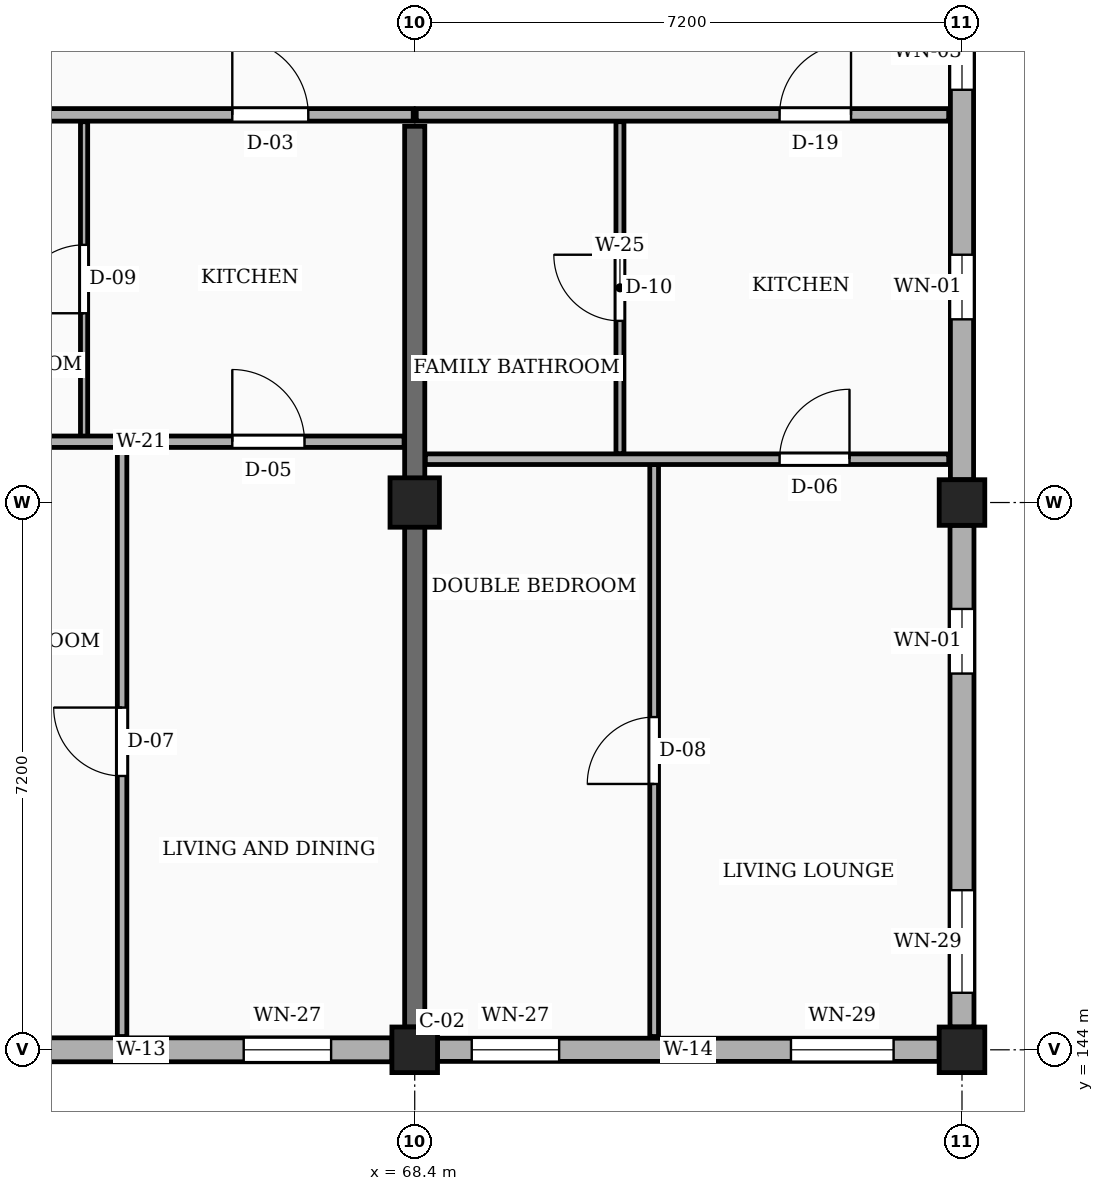
"""IFC4 building model, lengths in metres.
Left out: names, types, materials, properties, quantities, classifications, styles, units other than length and angle.
Written with IfcOpenShell. Run it as: python <this file> out.ifc"""

import sys

from ifc_helpers import new_model, si_unit, direction, frame, frame_2d, origin, origin_2d, place, context, subcontext, project, spatial, rectangle, extrude, element, fill, save


model = new_model("IFC4")
c1 = context("Model", 3, precision=1e-05, world=origin(), true_north=direction((0.0, 1.0)))
c2 = subcontext(c1, "Body", "Model", "MODEL_VIEW")
j1 = project(units=[si_unit("LENGTHUNIT", "METRE"), si_unit("PLANEANGLEUNIT", "RADIAN")], contexts=[c1])
p1 = place(None, origin())
s1 = spatial("IfcSite", under=j1, at=p1, CompositionType="ELEMENT")
p2 = place(p1, origin())
s2 = spatial("IfcBuilding", under=s1, at=p2, CompositionType="ELEMENT")
p3 = place(p2, frame((0.0, 0.0, 4.5)))
s3 = spatial("IfcBuildingStorey", under=s2, at=p3, CompositionType="ELEMENT", Elevation=4.5)
p4 = place(p3, frame((68.4, 144.0, 0.0), z_axis=(0.0, 0.0, 1.0), x_axis=(1.0, 0.0, 0.0)))
e1 = element("IfcColumn", 1, at=p4, inside=s3, PredefinedType="COLUMN", context=c2, shape_type="SweptSolid", body=[
    extrude(rectangle(XDim=0.6, YDim=0.6, at=origin_2d()), origin(), (0.0, 0.0, 1.0), 3.15),
])
p5 = place(p3, frame((68.4, 151.2, 0.0), z_axis=(0.0, 0.0, 1.0), x_axis=(1.0, 0.0, 0.0)))
e2 = element("IfcColumn", 2, at=p5, inside=s3, PredefinedType="COLUMN", context=c2, shape_type="SweptSolid", body=[
    extrude(rectangle(XDim=0.65, YDim=0.65, at=origin_2d()), origin(), (0.0, 0.0, 1.0), 3.15),
])
for number, where, z_axis, x_axis in (
    (3, (75.6, 144.0, 0.0), (0.0, 0.0, 1.0), (1.0, 0.0, 0.0)),
    (4, (75.6, 151.2, 0.0), (0.0, 0.0, 1.0), (1.0, 0.0, 0.0)),
):
    element("IfcColumn", number, at=place(p3, frame(where, z_axis=z_axis, x_axis=x_axis)), inside=s3, PredefinedType="COLUMN", context=c2, shape_type="SweptSolid", body=[
        extrude(rectangle(XDim=0.6, YDim=0.6, at=origin_2d()), origin(), (0.0, 0.0, 1.0), 3.15),
    ])
p6 = place(p3, frame((68.4, 144.3, 0.0), z_axis=(0.0, 0.0, 1.0), x_axis=(0.0, 1.0, 0.0)))
e5 = element("IfcWall", 5, at=p6, inside=s3, PredefinedType="SOLIDWALL", context=c2, shape_type="SweptSolid", body=[
    extrude(rectangle(XDim=11.85, YDim=0.265, at=frame_2d((5.925, 0.0))), origin(), (0.0, 0.0, 1.0), 2.185),
])
p7 = place(p3, frame((61.5, 144.0, 0.0), z_axis=(0.0, 0.0, 1.0), x_axis=(1.0, 0.0, 0.0)))
e6 = element("IfcWall", 6, at=p7, inside=s3, PredefinedType="SOLIDWALL", context=c2, shape_type="SweptSolid", body=[
    extrude(rectangle(XDim=6.6, YDim=0.315, at=frame_2d((3.3, 0.0))), origin(), (0.0, 0.0, 1.0), 2.455),
])
p8 = place(p7, frame((0.45, 0.0, 0.78)))
e7 = element("IfcOpeningElement", 7, at=p8, cuts=e6, PredefinedType="OPENING", context=c2, shape_type="SweptSolid", body=[
    extrude(rectangle(XDim=0.94, YDim=1.44, at=frame_2d((0.47, 0.72))), frame((0.0, 0.167, 0.0), z_axis=(0.0, -1.0, 0.0), x_axis=(1.0, 0.0, 0.0)), (0.0, 0.0, 1.0), 0.335),
])
p9 = place(p7, frame((4.65, 0.0, 0.78)))
e8 = element("IfcOpeningElement", 8, at=p9, cuts=e6, PredefinedType="OPENING", context=c2, shape_type="SweptSolid", body=[
    extrude(rectangle(XDim=1.15, YDim=1.44, at=frame_2d((0.575, 0.72))), frame((0.0, 0.167, 0.0), z_axis=(0.0, -1.0, 0.0), x_axis=(1.0, 0.0, 0.0)), (0.0, 0.0, 1.0), 0.335),
])
p10 = place(p3, frame((68.7, 144.0, 0.0), z_axis=(0.0, 0.0, 1.0), x_axis=(1.0, 0.0, 0.0)))
e9 = element("IfcWall", 9, at=p10, inside=s3, PredefinedType="SOLIDWALL", context=c2, shape_type="SweptSolid", body=[
    extrude(rectangle(XDim=6.6, YDim=0.305, at=frame_2d((3.3, 0.0))), origin(), (0.0, 0.0, 1.0), 2.455),
])
p11 = place(p10, frame((0.45, 0.0, 0.78)))
e10 = element("IfcOpeningElement", 10, at=p11, cuts=e9, PredefinedType="OPENING", context=c2, shape_type="SweptSolid", body=[
    extrude(rectangle(XDim=1.15, YDim=1.44, at=frame_2d((0.575, 0.72))), frame((0.0, 0.163, 0.0), z_axis=(0.0, -1.0, 0.0), x_axis=(1.0, 0.0, 0.0)), (0.0, 0.0, 1.0), 0.325),
])
p12 = place(p10, frame((4.65, 0.0, 0.78)))
e11 = element("IfcOpeningElement", 11, at=p12, cuts=e9, PredefinedType="OPENING", context=c2, shape_type="SweptSolid", body=[
    extrude(rectangle(XDim=1.35, YDim=1.44, at=frame_2d((0.675, 0.72))), frame((0.0, 0.163, 0.0), z_axis=(0.0, -1.0, 0.0), x_axis=(1.0, 0.0, 0.0)), (0.0, 0.0, 1.0), 0.325),
])
p13 = place(p3, frame((75.6, 144.3, 0.0), z_axis=(0.0, 0.0, 1.0), x_axis=(0.0, 1.0, 0.0)))
e12 = element("IfcWall", 12, at=p13, inside=s3, PredefinedType="SOLIDWALL", context=c2, shape_type="SweptSolid", body=[
    extrude(rectangle(XDim=6.6, YDim=0.315, at=frame_2d((3.3, 0.0))), origin(), (0.0, 0.0, 1.0), 2.455),
])
p14 = place(p13, frame((0.45, 0.0, 0.78)))
e13 = element("IfcOpeningElement", 13, at=p14, cuts=e12, PredefinedType="OPENING", context=c2, shape_type="SweptSolid", body=[
    extrude(rectangle(XDim=1.35, YDim=1.44, at=frame_2d((0.675, 0.72))), frame((0.0, 0.167, 0.0), z_axis=(0.0, -1.0, 0.0), x_axis=(1.0, 0.0, 0.0)), (0.0, 0.0, 1.0), 0.335),
])
p15 = place(p13, frame((4.65, 0.0, 0.78)))
e14 = element("IfcOpeningElement", 14, at=p15, cuts=e12, PredefinedType="OPENING", context=c2, shape_type="SweptSolid", body=[
    extrude(rectangle(XDim=0.85, YDim=1.15, at=frame_2d((0.425, 0.575))), frame((0.0, 0.167, 0.0), z_axis=(0.0, -1.0, 0.0), x_axis=(1.0, 0.0, 0.0)), (0.0, 0.0, 1.0), 0.335),
])
p16 = place(p3, frame((75.6, 151.5, 0.0), z_axis=(0.0, 0.0, 1.0), x_axis=(0.0, 1.0, 0.0)))
e15 = element("IfcWall", 15, at=p16, inside=s3, PredefinedType="SOLIDWALL", context=c2, shape_type="SweptSolid", body=[
    extrude(rectangle(XDim=6.6, YDim=0.305, at=frame_2d((3.3, 0.0))), origin(), (0.0, 0.0, 1.0), 2.455),
])
p17 = place(p16, frame((2.11, 0.0, 0.78)))
e16 = element("IfcOpeningElement", 16, at=p17, cuts=e15, PredefinedType="OPENING", context=c2, shape_type="SweptSolid", body=[
    extrude(rectangle(XDim=0.85, YDim=1.15, at=frame_2d((0.425, 0.575))), frame((0.0, 0.163, 0.0), z_axis=(0.0, -1.0, 0.0), x_axis=(1.0, 0.0, 0.0)), (0.0, 0.0, 1.0), 0.325),
])
p18 = place(p16, frame((5.13, 0.0, 0.78)))
e17 = element("IfcOpeningElement", 17, at=p18, cuts=e15, PredefinedType="OPENING", context=c2, shape_type="SweptSolid", body=[
    extrude(rectangle(XDim=1.0, YDim=1.15, at=frame_2d((0.5, 0.575))), frame((0.0, 0.163, 0.0), z_axis=(0.0, -1.0, 0.0), x_axis=(1.0, 0.0, 0.0)), (0.0, 0.0, 1.0), 0.325),
])
p19 = place(p3, frame((61.22, 156.3, 0.0), z_axis=(0.0, 0.0, 1.0), x_axis=(1.0, 0.0, 0.0)))
e18 = element("IfcWall", 18, at=p19, inside=s3, PredefinedType="PARTITIONING", context=c2, shape_type="SweptSolid", body=[
    extrude(rectangle(XDim=7.16, YDim=0.165, at=frame_2d((3.58, 0.0))), origin(), (0.0, 0.0, 1.0), 2.32),
])
p20 = place(p19, frame((4.78, 0.0, 0.0)))
e19 = element("IfcOpeningElement", 19, at=p20, cuts=e18, PredefinedType="OPENING", context=c2, shape_type="SweptSolid", body=[
    extrude(rectangle(XDim=1.0, YDim=2.15, at=frame_2d((0.5, 1.075))), frame((0.0, 0.093, 0.0), z_axis=(0.0, -1.0, 0.0), x_axis=(1.0, 0.0, 0.0)), (0.0, 0.0, 1.0), 0.185),
])
p21 = place(p3, frame((68.42, 156.3, 0.0), z_axis=(0.0, 0.0, 1.0), x_axis=(1.0, 0.0, 0.0)))
e20 = element("IfcWall", 20, at=p21, inside=s3, PredefinedType="PARTITIONING", context=c2, shape_type="SweptSolid", body=[
    extrude(rectangle(XDim=7.005, YDim=0.165, at=frame_2d((3.502, 0.0))), origin(), (0.0, 0.0, 1.0), 2.32),
])
p22 = place(p21, frame((4.78, 0.0, 0.0)))
e21 = element("IfcOpeningElement", 21, at=p22, cuts=e20, PredefinedType="OPENING", context=c2, shape_type="SweptSolid", body=[
    extrude(rectangle(XDim=0.94, YDim=2.12, at=frame_2d((0.47, 1.06))), frame((0.0, 0.093, 0.0), z_axis=(0.0, -1.0, 0.0), x_axis=(1.0, 0.0, 0.0)), (0.0, 0.0, 1.0), 0.185),
])
p23 = place(p3, frame((64.55, 144.175, 0.0), z_axis=(0.0, 0.0, 1.0), x_axis=(0.0, 1.0, 0.0)))
e22 = element("IfcWall", 22, at=p23, inside=s3, PredefinedType="PARTITIONING", context=c2, shape_type="SweptSolid", body=[
    extrude(rectangle(XDim=7.755, YDim=0.125, at=frame_2d((3.877, 0.0))), origin(), (0.0, 0.0, 1.0), 2.32),
])
p24 = place(p23, frame((3.427, 0.0, 0.0)))
e23 = element("IfcOpeningElement", 23, at=p24, cuts=e22, PredefinedType="OPENING", context=c2, shape_type="SweptSolid", body=[
    extrude(rectangle(XDim=0.9, YDim=2.1, at=frame_2d((0.45, 1.05))), frame((0.0, 0.073, 0.0), z_axis=(0.0, -1.0, 0.0), x_axis=(1.0, 0.0, 0.0)), (0.0, 0.0, 1.0), 0.145),
])
p25 = place(p3, frame((64.05, 152.07, 0.0), z_axis=(0.0, 0.0, 1.0), x_axis=(0.0, 1.0, 0.0)))
e24 = element("IfcWall", 24, at=p25, inside=s3, PredefinedType="PARTITIONING", context=c2, shape_type="SweptSolid", body=[
    extrude(rectangle(XDim=4.14, YDim=0.095, at=frame_2d((2.07, 0.0))), origin(), (0.0, 0.0, 1.0), 2.32),
])
p26 = place(p25, frame((1.62, 0.0, 0.0)))
e25 = element("IfcOpeningElement", 25, at=p26, cuts=e24, PredefinedType="OPENING", context=c2, shape_type="SweptSolid", body=[
    extrude(rectangle(XDim=0.9, YDim=2.05, at=frame_2d((0.45, 1.025))), frame((0.0, 0.058, 0.0), z_axis=(0.0, -1.0, 0.0), x_axis=(1.0, 0.0, 0.0)), (0.0, 0.0, 1.0), 0.115),
])
p27 = place(p3, frame((61.34, 152.0, 0.0), z_axis=(0.0, 0.0, 1.0), x_axis=(1.0, 0.0, 0.0)))
e26 = element("IfcWall", 26, at=p27, inside=s3, PredefinedType="PARTITIONING", context=c2, shape_type="SweptSolid", body=[
    extrude(rectangle(XDim=6.92, YDim=0.15, at=frame_2d((3.46, 0.0))), origin(), (0.0, 0.0, 1.0), 2.32),
])
p28 = place(p27, frame((4.66, 0.0, 0.0)))
e27 = element("IfcOpeningElement", 27, at=p28, cuts=e26, PredefinedType="OPENING", context=c2, shape_type="SweptSolid", body=[
    extrude(rectangle(XDim=0.95, YDim=2.1, at=frame_2d((0.475, 1.05))), frame((0.0, 0.085, 0.0), z_axis=(0.0, -1.0, 0.0), x_axis=(1.0, 0.0, 0.0)), (0.0, 0.0, 1.0), 0.17),
])
p29 = place(p3, frame((71.55, 144.175, 0.0), z_axis=(0.0, 0.0, 1.0), x_axis=(0.0, 1.0, 0.0)))
e28 = element("IfcWall", 28, at=p29, inside=s3, PredefinedType="PARTITIONING", context=c2, shape_type="SweptSolid", body=[
    extrude(rectangle(XDim=7.525, YDim=0.115, at=frame_2d((3.762, 0.0))), origin(), (0.0, 0.0, 1.0), 2.32),
])
p30 = place(p29, frame((3.323, 0.0, 0.0)))
e29 = element("IfcOpeningElement", 29, at=p30, cuts=e28, PredefinedType="OPENING", context=c2, shape_type="SweptSolid", body=[
    extrude(rectangle(XDim=0.88, YDim=2.08, at=frame_2d((0.44, 1.04))), frame((0.0, 0.067, 0.0), z_axis=(0.0, -1.0, 0.0), x_axis=(1.0, 0.0, 0.0)), (0.0, 0.0, 1.0), 0.135),
])
p31 = place(p3, frame((71.1, 151.84, 0.0), z_axis=(0.0, 0.0, 1.0), x_axis=(0.0, 1.0, 0.0)))
e30 = element("IfcWall", 30, at=p31, inside=s3, PredefinedType="PARTITIONING", context=c2, shape_type="SweptSolid", body=[
    extrude(rectangle(XDim=4.37, YDim=0.105, at=frame_2d((2.185, 0.0))), origin(), (0.0, 0.0, 1.0), 2.32),
])
p32 = place(p31, frame((1.75, 0.0, 0.0)))
e31 = element("IfcOpeningElement", 31, at=p32, cuts=e30, PredefinedType="OPENING", context=c2, shape_type="SweptSolid", body=[
    extrude(rectangle(XDim=0.87, YDim=2.05, at=frame_2d((0.435, 1.025))), frame((0.0, 0.062, 0.0), z_axis=(0.0, -1.0, 0.0), x_axis=(1.0, 0.0, 0.0)), (0.0, 0.0, 1.0), 0.125),
])
p33 = place(p3, frame((68.54, 151.77, 0.0), z_axis=(0.0, 0.0, 1.0), x_axis=(1.0, 0.0, 0.0)))
e32 = element("IfcWall", 32, at=p33, inside=s3, PredefinedType="PARTITIONING", context=c2, shape_type="SweptSolid", body=[
    extrude(rectangle(XDim=6.885, YDim=0.14, at=frame_2d((3.442, 0.0))), origin(), (0.0, 0.0, 1.0), 2.32),
])
p34 = place(p33, frame((4.66, 0.0, 0.0)))
e33 = element("IfcOpeningElement", 33, at=p34, cuts=e32, PredefinedType="OPENING", context=c2, shape_type="SweptSolid", body=[
    extrude(rectangle(XDim=0.92, YDim=2.1, at=frame_2d((0.46, 1.05))), frame((0.0, 0.08, 0.0), z_axis=(0.0, -1.0, 0.0), x_axis=(1.0, 0.0, 0.0)), (0.0, 0.0, 1.0), 0.16),
])
p35 = place(p9, origin())
e34 = element("IfcWindow", 34, at=p35, inside=s3, PartitioningType="SINGLE_PANEL", PredefinedType="WINDOW", context=c2, shape_type="SweptSolid", body=[
    extrude(rectangle(XDim=1.15, YDim=1.44, at=frame_2d((0.575, 0.72))), frame((0.0, 0.03, 0.0), z_axis=(0.0, -1.0, 0.0), x_axis=(1.0, 0.0, 0.0)), (0.0, 0.0, 1.0), 0.06),
])
fill(e8, e34)
p36 = place(p11, origin())
e35 = element("IfcWindow", 35, at=p36, inside=s3, PartitioningType="SINGLE_PANEL", PredefinedType="WINDOW", context=c2, shape_type="SweptSolid", body=[
    extrude(rectangle(XDim=1.15, YDim=1.44, at=frame_2d((0.575, 0.72))), frame((0.0, 0.03, 0.0), z_axis=(0.0, -1.0, 0.0), x_axis=(1.0, 0.0, 0.0)), (0.0, 0.0, 1.0), 0.06),
])
fill(e10, e35)
p37 = place(p12, origin())
e36 = element("IfcWindow", 36, at=p37, inside=s3, PartitioningType="SINGLE_PANEL", PredefinedType="WINDOW", context=c2, shape_type="SweptSolid", body=[
    extrude(rectangle(XDim=1.35, YDim=1.44, at=frame_2d((0.675, 0.72))), frame((0.0, 0.03, 0.0), z_axis=(0.0, -1.0, 0.0), x_axis=(1.0, 0.0, 0.0)), (0.0, 0.0, 1.0), 0.06),
])
fill(e11, e36)
p38 = place(p14, origin())
e37 = element("IfcWindow", 37, at=p38, inside=s3, PartitioningType="SINGLE_PANEL", PredefinedType="WINDOW", context=c2, shape_type="SweptSolid", body=[
    extrude(rectangle(XDim=1.35, YDim=1.44, at=frame_2d((0.675, 0.72))), frame((0.0, 0.03, 0.0), z_axis=(0.0, -1.0, 0.0), x_axis=(1.0, 0.0, 0.0)), (0.0, 0.0, 1.0), 0.06),
])
fill(e13, e37)
p39 = place(p15, origin())
e38 = element("IfcWindow", 38, at=p39, inside=s3, PartitioningType="SINGLE_PANEL", PredefinedType="WINDOW", context=c2, shape_type="SweptSolid", body=[
    extrude(rectangle(XDim=0.85, YDim=1.15, at=frame_2d((0.425, 0.575))), frame((0.0, 0.03, 0.0), z_axis=(0.0, -1.0, 0.0), x_axis=(1.0, 0.0, 0.0)), (0.0, 0.0, 1.0), 0.06),
])
fill(e14, e38)
p40 = place(p17, origin())
e39 = element("IfcWindow", 39, at=p40, inside=s3, PartitioningType="SINGLE_PANEL", PredefinedType="WINDOW", context=c2, shape_type="SweptSolid", body=[
    extrude(rectangle(XDim=0.85, YDim=1.15, at=frame_2d((0.425, 0.575))), frame((0.0, 0.03, 0.0), z_axis=(0.0, -1.0, 0.0), x_axis=(1.0, 0.0, 0.0)), (0.0, 0.0, 1.0), 0.06),
])
fill(e16, e39)
p41 = place(p18, origin())
e40 = element("IfcWindow", 40, at=p41, inside=s3, PartitioningType="SINGLE_PANEL", PredefinedType="WINDOW", context=c2, shape_type="SweptSolid", body=[
    extrude(rectangle(XDim=1.0, YDim=1.15, at=frame_2d((0.5, 0.575))), frame((0.0, 0.03, 0.0), z_axis=(0.0, -1.0, 0.0), x_axis=(1.0, 0.0, 0.0)), (0.0, 0.0, 1.0), 0.06),
])
fill(e17, e40)
p42 = place(p20, origin())
e41 = element("IfcDoor", 41, at=p42, inside=s3, OperationType="SINGLE_SWING_LEFT", PredefinedType="DOOR", context=c2, shape_type="SweptSolid", body=[
    extrude(rectangle(XDim=1.0, YDim=2.15, at=frame_2d((0.5, 1.075))), frame((0.0, 0.025, 0.0), z_axis=(0.0, -1.0, 0.0), x_axis=(1.0, 0.0, 0.0)), (0.0, 0.0, 1.0), 0.05),
])
fill(e19, e41)
p43 = place(p22, origin())
e42 = element("IfcDoor", 42, at=p43, inside=s3, OperationType="SINGLE_SWING_RIGHT", PredefinedType="DOOR", context=c2, shape_type="SweptSolid", body=[
    extrude(rectangle(XDim=0.94, YDim=2.12, at=frame_2d((0.47, 1.06))), frame((0.0, 0.025, 0.0), z_axis=(0.0, -1.0, 0.0), x_axis=(1.0, 0.0, 0.0)), (0.0, 0.0, 1.0), 0.05),
])
fill(e21, e42)
p44 = place(p24, origin())
e43 = element("IfcDoor", 43, at=p44, inside=s3, OperationType="SINGLE_SWING_RIGHT", PredefinedType="DOOR", context=c2, shape_type="SweptSolid", body=[
    extrude(rectangle(XDim=0.9, YDim=2.1, at=frame_2d((0.45, 1.05))), frame((0.0, 0.025, 0.0), z_axis=(0.0, -1.0, 0.0), x_axis=(1.0, 0.0, 0.0)), (0.0, 0.0, 1.0), 0.05),
])
fill(e23, e43)
p45 = place(p26, origin())
e44 = element("IfcDoor", 44, at=p45, inside=s3, OperationType="SINGLE_SWING_LEFT", PredefinedType="DOOR", context=c2, shape_type="SweptSolid", body=[
    extrude(rectangle(XDim=0.9, YDim=2.05, at=frame_2d((0.45, 1.025))), frame((0.0, 0.025, 0.0), z_axis=(0.0, -1.0, 0.0), x_axis=(1.0, 0.0, 0.0)), (0.0, 0.0, 1.0), 0.05),
])
fill(e25, e44)
p46 = place(p28, origin())
e45 = element("IfcDoor", 45, at=p46, inside=s3, OperationType="SINGLE_SWING_LEFT", PredefinedType="DOOR", context=c2, shape_type="SweptSolid", body=[
    extrude(rectangle(XDim=0.95, YDim=2.1, at=frame_2d((0.475, 1.05))), frame((0.0, 0.025, 0.0), z_axis=(0.0, -1.0, 0.0), x_axis=(1.0, 0.0, 0.0)), (0.0, 0.0, 1.0), 0.05),
])
fill(e27, e45)
p47 = place(p30, origin())
e46 = element("IfcDoor", 46, at=p47, inside=s3, OperationType="SINGLE_SWING_LEFT", PredefinedType="DOOR", context=c2, shape_type="SweptSolid", body=[
    extrude(rectangle(XDim=0.88, YDim=2.08, at=frame_2d((0.44, 1.04))), frame((0.0, 0.025, 0.0), z_axis=(0.0, -1.0, 0.0), x_axis=(1.0, 0.0, 0.0)), (0.0, 0.0, 1.0), 0.05),
])
fill(e29, e46)
p48 = place(p32, origin())
e47 = element("IfcDoor", 47, at=p48, inside=s3, OperationType="SINGLE_SWING_RIGHT", PredefinedType="DOOR", context=c2, shape_type="SweptSolid", body=[
    extrude(rectangle(XDim=0.87, YDim=2.05, at=frame_2d((0.435, 1.025))), frame((0.0, 0.025, 0.0), z_axis=(0.0, -1.0, 0.0), x_axis=(1.0, 0.0, 0.0)), (0.0, 0.0, 1.0), 0.05),
])
fill(e31, e47)
p49 = place(p34, origin())
e48 = element("IfcDoor", 48, at=p49, inside=s3, OperationType="SINGLE_SWING_RIGHT", PredefinedType="DOOR", context=c2, shape_type="SweptSolid", body=[
    extrude(rectangle(XDim=0.92, YDim=2.1, at=frame_2d((0.46, 1.05))), frame((0.0, 0.025, 0.0), z_axis=(0.0, -1.0, 0.0), x_axis=(1.0, 0.0, 0.0)), (0.0, 0.0, 1.0), 0.05),
])
fill(e33, e48)
save(model, sys.argv[1])
